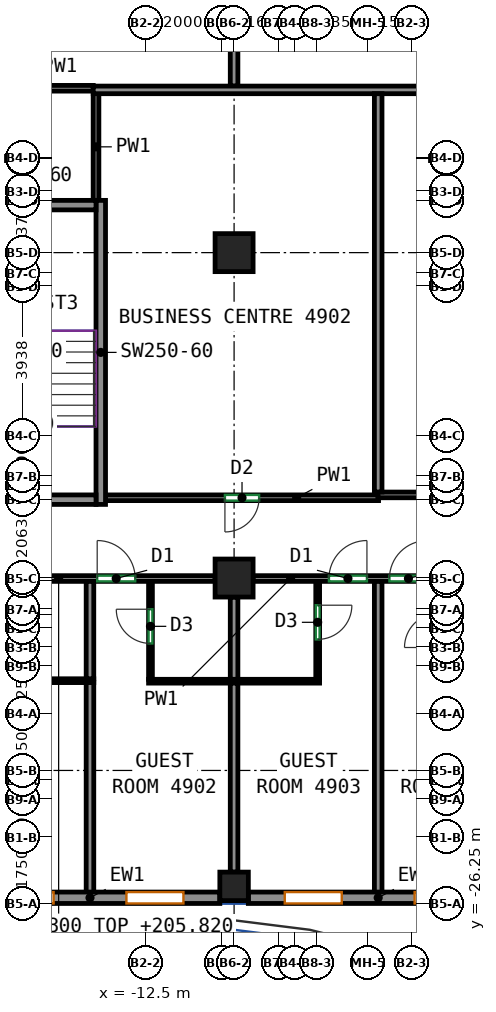
"""IFC4 building model, lengths in metres.
Left out: names, types, materials, properties, quantities, classifications, styles, units other than length and angle.
Written with IfcOpenShell. Run it as: python <this file> out.ifc"""

import sys

from ifc_helpers import new_model, si_unit, direction, frame, frame_2d, origin, origin_2d, place, context, subcontext, project, spatial, rectangle, extrude, source, transform, mapped, element, fill, save


model = new_model("IFC4")
c1 = context("Model", 3, precision=1e-05, world=origin(), true_north=direction((0.0, 1.0)))
c2 = subcontext(c1, "Body", "Model", "MODEL_VIEW")
j1 = project(units=[si_unit("LENGTHUNIT", "METRE"), si_unit("PLANEANGLEUNIT", "RADIAN")], contexts=[c1])
p1 = place(None, origin())
s1 = spatial("IfcSite", under=j1, at=p1, CompositionType="ELEMENT")
p2 = place(p1, origin())
s2 = spatial("IfcBuilding", under=s1, at=p2, CompositionType="ELEMENT")
p3 = place(p2, frame((0.0, 0.0, 203.3)))
s3 = spatial("IfcBuildingStorey", under=s2, at=p3, CompositionType="ELEMENT", Elevation=203.3)
m1 = source(origin(), c2, "Body", "SweptSolid", [
    extrude(rectangle(XDim=0.75, YDim=0.75, at=origin_2d()), origin(), (0.0, 0.0, 1.0), 3.12),
])
p4 = place(p3, frame((-10.167, -25.8, 0.0), z_axis=(0.0, 0.0, 1.0), x_axis=(1.0, 0.0, 0.0)))
e1 = element("IfcColumn", 1, at=p4, inside=s3, PredefinedType="COLUMN", context=c2, shape_type="MappedRepresentation", body=[
    mapped(m1, transform((0.0, 0.0, 0.0))),
])
m2 = source(origin(), c2, "Body", "SweptSolid", [
    extrude(rectangle(XDim=1.0, YDim=1.0, at=origin_2d()), origin(), (0.0, 0.0, 1.0), 3.12),
])
for number, where, z_axis, x_axis in (
    (2, (-10.167, -17.688, 0.0), (0.0, 0.0, 1.0), (1.0, 0.0, 0.0)),
    (3, (-10.167, -9.125, 0.0), (0.0, 0.0, 1.0), (1.0, 0.0, 0.0)),
):
    element("IfcColumn", number, at=place(p3, frame(where, z_axis=z_axis, x_axis=x_axis)), inside=s3, PredefinedType="COLUMN", context=c2, shape_type="MappedRepresentation", body=[
        mapped(m2, transform((0.0, 0.0, 0.0))),
    ])
m3 = source(origin(), c2, "Body", "SweptSolid", [
    extrude(rectangle(XDim=8.0, YDim=0.25, at=frame_2d((4.0, 0.0))), origin(), (0.0, 0.0, 1.0), 3.12),
])
p5 = place(p3, frame((-13.675, -15.75, 0.0), z_axis=(0.0, 0.0, 1.0), x_axis=(0.0, 1.0, 0.0)))
e4 = element("IfcWall", 4, at=p5, inside=s3, PredefinedType="SHEAR", context=c2, shape_type="MappedRepresentation", body=[
    mapped(m3, transform((0.0, 0.0, 0.0))),
])
m4 = source(origin(), c2, "Body", "SweptSolid", [
    extrude(rectangle(XDim=3.7, YDim=0.25, at=frame_2d((1.85, 0.0))), origin(), (0.0, 0.0, 1.0), 3.12),
])
p6 = place(p3, frame((-17.5, -15.625, 0.0), z_axis=(0.0, 0.0, 1.0), x_axis=(1.0, 0.0, 0.0)))
e5 = element("IfcWall", 5, at=p6, inside=s3, PredefinedType="SHEAR", context=c2, shape_type="MappedRepresentation", body=[
    mapped(m4, transform((0.0, 0.0, 0.0))),
])
p7 = place(p6, frame((1.25, 0.0, 0.0)))
e6 = element("IfcOpeningElement", 6, at=p7, cuts=e5, PredefinedType="OPENING", context=c2, shape_type="SweptSolid", body=[
    extrude(rectangle(XDim=1.2, YDim=2.1, at=frame_2d((0.6, 1.05))), frame((0.0, 0.135, 0.0), z_axis=(0.0, -1.0, 0.0), x_axis=(1.0, 0.0, 0.0)), (0.0, 0.0, 1.0), 0.27),
])
p8 = place(p3, frame((-17.5, -7.875, 0.0), z_axis=(0.0, 0.0, 1.0), x_axis=(1.0, 0.0, 0.0)))
e7 = element("IfcWall", 7, at=p8, inside=s3, PredefinedType="SHEAR", context=c2, shape_type="MappedRepresentation", body=[
    mapped(m4, transform((0.0, 0.0, 0.0))),
])
m5 = source(origin(), c2, "Body", "SweptSolid", [
    extrude(rectangle(XDim=6.833, YDim=0.3, at=frame_2d((3.417, 0.0))), origin(), (0.0, 0.0, 1.0), 3.12),
])
p9 = place(p3, frame((-17.375, -26.1, 0.0), z_axis=(0.0, 0.0, 1.0), x_axis=(1.0, 0.0, 0.0)))
e8 = element("IfcWall", 8, at=p9, inside=s3, PredefinedType="SOLIDWALL", context=c2, shape_type="MappedRepresentation", body=[
    mapped(m5, transform((0.0, 0.0, 0.0))),
])
p10 = place(p9, frame((0.958, 0.0, 0.85)))
e9 = element("IfcOpeningElement", 9, at=p10, cuts=e8, PredefinedType="OPENING", context=c2, shape_type="SweptSolid", body=[
    extrude(rectangle(XDim=1.5, YDim=1.95, at=frame_2d((0.75, 0.975))), frame((0.0, 0.16, 0.0), z_axis=(0.0, -1.0, 0.0), x_axis=(1.0, 0.0, 0.0)), (0.0, 0.0, 1.0), 0.32),
])
p11 = place(p9, frame((4.375, 0.0, 0.85)))
e10 = element("IfcOpeningElement", 10, at=p11, cuts=e8, PredefinedType="OPENING", context=c2, shape_type="SweptSolid", body=[
    extrude(rectangle(XDim=1.5, YDim=1.95, at=frame_2d((0.75, 0.975))), frame((0.0, 0.16, 0.0), z_axis=(0.0, -1.0, 0.0), x_axis=(1.0, 0.0, 0.0)), (0.0, 0.0, 1.0), 0.32),
])
m6 = source(origin(), c2, "Body", "SweptSolid", [
    extrude(rectangle(XDim=6.833, YDim=0.3, at=frame_2d((3.417, 0.0))), origin(), (0.0, 0.0, 1.0), 3.12),
])
p12 = place(p3, frame((-9.792, -26.1, 0.0), z_axis=(0.0, 0.0, 1.0), x_axis=(1.0, 0.0, 0.0)))
e11 = element("IfcWall", 11, at=p12, inside=s3, PredefinedType="SOLIDWALL", context=c2, shape_type="MappedRepresentation", body=[
    mapped(m6, transform((0.0, 0.0, 0.0))),
])
p13 = place(p12, frame((0.958, 0.0, 0.85)))
e12 = element("IfcOpeningElement", 12, at=p13, cuts=e11, PredefinedType="OPENING", context=c2, shape_type="SweptSolid", body=[
    extrude(rectangle(XDim=1.5, YDim=1.95, at=frame_2d((0.75, 0.975))), frame((0.0, 0.16, 0.0), z_axis=(0.0, -1.0, 0.0), x_axis=(1.0, 0.0, 0.0)), (0.0, 0.0, 1.0), 0.32),
])
p14 = place(p12, frame((4.375, 0.0, 0.85)))
e13 = element("IfcOpeningElement", 13, at=p14, cuts=e11, PredefinedType="OPENING", context=c2, shape_type="SweptSolid", body=[
    extrude(rectangle(XDim=1.5, YDim=1.95, at=frame_2d((0.75, 0.975))), frame((0.0, 0.16, 0.0), z_axis=(0.0, -1.0, 0.0), x_axis=(1.0, 0.0, 0.0)), (0.0, 0.0, 1.0), 0.32),
])
p15 = place(p3, frame((-18.9, -17.7, 0.0), z_axis=(0.0, 0.0, 1.0), x_axis=(1.0, 0.0, 0.0)))
e14 = element("IfcWall", 14, at=p15, inside=s3, PredefinedType="PARTITIONING", context=c2, shape_type="SweptSolid", body=[
    extrude(rectangle(XDim=8.233, YDim=0.15, at=frame_2d((4.116, 0.0))), origin(), (0.0, 0.0, 1.0), 2.52),
])
p16 = place(p15, frame((1.135, 0.0, 0.0)))
e15 = element("IfcOpeningElement", 15, at=p16, cuts=e14, PredefinedType="OPENING", context=c2, shape_type="SweptSolid", body=[
    extrude(rectangle(XDim=1.0, YDim=2.1, at=frame_2d((0.5, 1.05))), frame((0.0, 0.085, 0.0), z_axis=(0.0, -1.0, 0.0), x_axis=(1.0, 0.0, 0.0)), (0.0, 0.0, 1.0), 0.17),
])
p17 = place(p15, frame((5.131, 0.0, 0.0)))
e16 = element("IfcOpeningElement", 16, at=p17, cuts=e14, PredefinedType="OPENING", context=c2, shape_type="SweptSolid", body=[
    extrude(rectangle(XDim=1.0, YDim=2.1, at=frame_2d((0.5, 1.05))), frame((0.0, 0.085, 0.0), z_axis=(0.0, -1.0, 0.0), x_axis=(1.0, 0.0, 0.0)), (0.0, 0.0, 1.0), 0.17),
])
p18 = place(p3, frame((-9.667, -17.7, 0.0), z_axis=(0.0, 0.0, 1.0), x_axis=(1.0, 0.0, 0.0)))
e17 = element("IfcWall", 17, at=p18, inside=s3, PredefinedType="PARTITIONING", context=c2, shape_type="SweptSolid", body=[
    extrude(rectangle(XDim=6.584, YDim=0.15, at=frame_2d((3.292, 0.0))), origin(), (0.0, 0.0, 1.0), 3.12),
])
p19 = place(p18, frame((1.996, 0.0, 0.0)))
e18 = element("IfcOpeningElement", 18, at=p19, cuts=e17, PredefinedType="OPENING", context=c2, shape_type="SweptSolid", body=[
    extrude(rectangle(XDim=1.0, YDim=2.1, at=frame_2d((0.5, 1.05))), frame((0.0, 0.085, 0.0), z_axis=(0.0, -1.0, 0.0), x_axis=(1.0, 0.0, 0.0)), (0.0, 0.0, 1.0), 0.17),
])
p20 = place(p18, frame((3.588, 0.0, 0.0)))
e19 = element("IfcOpeningElement", 19, at=p20, cuts=e17, PredefinedType="OPENING", context=c2, shape_type="SweptSolid", body=[
    extrude(rectangle(XDim=1.0, YDim=2.1, at=frame_2d((0.5, 1.05))), frame((0.0, 0.085, 0.0), z_axis=(0.0, -1.0, 0.0), x_axis=(1.0, 0.0, 0.0)), (0.0, 0.0, 1.0), 0.17),
])
p21 = place(p3, frame((-17.575, -4.8, 0.0), z_axis=(0.0, 0.0, 1.0), x_axis=(1.0, 0.0, 0.0)))
e20 = element("IfcWall", 20, at=p21, inside=s3, PredefinedType="PARTITIONING", context=c2, shape_type="SweptSolid", body=[
    extrude(rectangle(XDim=3.702, YDim=0.15, at=frame_2d((1.851, 0.0))), origin(), (0.0, 0.0, 1.0), 3.12),
])
p22 = place(p3, frame((-13.8, -7.75, 0.0), z_axis=(0.0, 0.0, 1.0), x_axis=(0.0, 1.0, 0.0)))
e21 = element("IfcWall", 21, at=p22, inside=s3, PredefinedType="PARTITIONING", context=c2, shape_type="SweptSolid", body=[
    extrude(rectangle(XDim=2.817, YDim=0.15, at=frame_2d((1.408, 0.0))), origin(), (0.0, 0.0, 1.0), 3.12),
])
p23 = place(p3, frame((-6.365, -15.575, 0.0), z_axis=(0.0, 0.0, 1.0), x_axis=(-1.0, 0.0, 0.0)))
e22 = element("IfcWall", 22, at=p23, inside=s3, PredefinedType="PARTITIONING", context=c2, shape_type="SweptSolid", body=[
    extrude(rectangle(XDim=7.185, YDim=0.15, at=frame_2d((3.593, 0.0))), origin(), (0.0, 0.0, 1.0), 3.12),
])
p24 = place(p23, frame((3.143, 0.0, 0.0)))
e23 = element("IfcOpeningElement", 23, at=p24, cuts=e22, PredefinedType="OPENING", context=c2, shape_type="SweptSolid", body=[
    extrude(rectangle(XDim=0.9, YDim=2.1, at=frame_2d((0.45, 1.05))), frame((0.0, 0.085, 0.0), z_axis=(0.0, -1.0, 0.0), x_axis=(1.0, 0.0, 0.0)), (0.0, 0.0, 1.0), 0.17),
])
p25 = place(p3, frame((-6.385, -15.5, 0.0), z_axis=(0.0, 0.0, 1.0), x_axis=(1.0, 0.0, 0.0)))
e24 = element("IfcWall", 24, at=p25, inside=s3, PredefinedType="PARTITIONING", context=c2, shape_type="SweptSolid", body=[
    extrude(rectangle(XDim=22.66, YDim=0.15, at=frame_2d((11.33, 0.0))), origin(), (0.0, 0.0, 1.0), 3.12),
])
p26 = place(p25, frame((7.266, 0.0, 0.0)))
e25 = element("IfcOpeningElement", 25, at=p26, cuts=e24, PredefinedType="OPENING", context=c2, shape_type="SweptSolid", body=[
    extrude(rectangle(XDim=0.9, YDim=2.1, at=frame_2d((0.45, 1.05))), frame((0.0, 0.085, 0.0), z_axis=(0.0, -1.0, 0.0), x_axis=(1.0, 0.0, 0.0)), (0.0, 0.0, 1.0), 0.17),
])
p27 = place(p25, frame((14.576, 0.0, 0.0)))
e26 = element("IfcOpeningElement", 26, at=p27, cuts=e24, PredefinedType="OPENING", context=c2, shape_type="SweptSolid", body=[
    extrude(rectangle(XDim=0.9, YDim=2.1, at=frame_2d((0.45, 1.05))), frame((0.0, 0.085, 0.0), z_axis=(0.0, -1.0, 0.0), x_axis=(1.0, 0.0, 0.0)), (0.0, 0.0, 1.0), 0.17),
])
p28 = place(p3, frame((-16.209, -20.388, 0.0), z_axis=(0.0, 0.0, 1.0), x_axis=(1.0, 0.0, 0.0)))
e27 = element("IfcWall", 27, at=p28, inside=s3, PredefinedType="PARTITIONING", context=c2, shape_type="SweptSolid", body=[
    extrude(rectangle(XDim=2.35, YDim=0.1, at=frame_2d((1.175, 0.0))), origin(), (0.0, 0.0, 1.0), 3.12),
])
p29 = place(p3, frame((-13.959, -26.0, 0.0), z_axis=(0.0, 0.0, 1.0), x_axis=(0.0, 1.0, 0.0)))
e28 = element("IfcWall", 28, at=p29, inside=s3, PredefinedType="PARTITIONING", context=c2, shape_type="SweptSolid", body=[
    extrude(rectangle(XDim=5.562, YDim=0.2, at=frame_2d((2.781, 0.0))), origin(), (0.0, 0.0, 1.0), 3.12),
])
p30 = place(p3, frame((-13.959, -20.338, 0.0), z_axis=(0.0, 0.0, 1.0), x_axis=(0.0, 1.0, 0.0)))
e29 = element("IfcWall", 29, at=p30, inside=s3, PredefinedType="PARTITIONING", context=c2, shape_type="SweptSolid", body=[
    extrude(rectangle(XDim=2.561, YDim=0.2, at=frame_2d((1.28, 0.0))), origin(), (0.0, 0.0, 1.0), 3.12),
])
p31 = place(p3, frame((-12.367, -20.352, 0.0), z_axis=(0.0, 0.0, 1.0), x_axis=(0.0, 1.0, 0.0)))
e30 = element("IfcWall", 30, at=p31, inside=s3, PredefinedType="PARTITIONING", context=c2, shape_type="SweptSolid", body=[
    extrude(rectangle(XDim=2.575, YDim=0.1, at=frame_2d((1.288, 0.0))), origin(), (0.0, 0.0, 1.0), 3.12),
])
p32 = place(p31, frame((0.944, 0.0, 0.0)))
e31 = element("IfcOpeningElement", 31, at=p32, cuts=e30, PredefinedType="OPENING", context=c2, shape_type="SweptSolid", body=[
    extrude(rectangle(XDim=0.9, YDim=2.1, at=frame_2d((0.45, 1.05))), frame((0.0, 0.06, 0.0), z_axis=(0.0, -1.0, 0.0), x_axis=(1.0, 0.0, 0.0)), (0.0, 0.0, 1.0), 0.12),
])
p33 = place(p3, frame((-12.417, -20.402, 0.0), z_axis=(0.0, 0.0, 1.0), x_axis=(1.0, 0.0, 0.0)))
e32 = element("IfcWall", 32, at=p33, inside=s3, PredefinedType="PARTITIONING", context=c2, shape_type="SweptSolid", body=[
    extrude(rectangle(XDim=4.5, YDim=0.1, at=frame_2d((2.25, 0.0))), origin(), (0.0, 0.0, 1.0), 3.12),
])
p34 = place(p3, frame((-10.167, -25.425, 0.0), z_axis=(0.0, 0.0, 1.0), x_axis=(0.0, 1.0, 0.0)))
e33 = element("IfcWall", 33, at=p34, inside=s3, PredefinedType="PARTITIONING", context=c2, shape_type="SweptSolid", body=[
    extrude(rectangle(XDim=4.973, YDim=0.2, at=frame_2d((2.487, 0.0))), origin(), (0.0, 0.0, 1.0), 3.12),
])
p35 = place(p3, frame((-10.167, -20.352, 0.0), z_axis=(0.0, 0.0, 1.0), x_axis=(0.0, 1.0, 0.0)))
e34 = element("IfcWall", 34, at=p35, inside=s3, PredefinedType="PARTITIONING", context=c2, shape_type="SweptSolid", body=[
    extrude(rectangle(XDim=2.164, YDim=0.2, at=frame_2d((1.082, 0.0))), origin(), (0.0, 0.0, 1.0), 3.12),
])
p36 = place(p3, frame((-7.967, -17.777, 0.0), z_axis=(0.0, 0.0, 1.0), x_axis=(0.0, -1.0, 0.0)))
e35 = element("IfcWall", 35, at=p36, inside=s3, PredefinedType="PARTITIONING", context=c2, shape_type="SweptSolid", body=[
    extrude(rectangle(XDim=2.575, YDim=0.1, at=frame_2d((1.288, 0.0))), origin(), (0.0, 0.0, 1.0), 3.12),
])
p37 = place(p36, frame((0.625, 0.0, 0.0)))
e36 = element("IfcOpeningElement", 36, at=p37, cuts=e35, PredefinedType="OPENING", context=c2, shape_type="SweptSolid", body=[
    extrude(rectangle(XDim=0.9, YDim=2.1, at=frame_2d((0.45, 1.05))), frame((0.0, 0.06, 0.0), z_axis=(0.0, -1.0, 0.0), x_axis=(1.0, 0.0, 0.0)), (0.0, 0.0, 1.0), 0.12),
])
p38 = place(p3, frame((-6.375, -26.0, 0.0), z_axis=(0.0, 0.0, 1.0), x_axis=(0.0, 1.0, 0.0)))
e37 = element("IfcWall", 37, at=p38, inside=s3, PredefinedType="PARTITIONING", context=c2, shape_type="SweptSolid", body=[
    extrude(rectangle(XDim=8.223, YDim=0.2, at=frame_2d((4.111, 0.0))), origin(), (0.0, 0.0, 1.0), 3.12),
])
p39 = place(p3, frame((-10.167, -4.743, 0.0), z_axis=(0.0, 0.0, 1.0), x_axis=(0.0, 1.0, 0.0)))
e38 = element("IfcWall", 38, at=p39, inside=s3, PredefinedType="PARTITIONING", context=c2, shape_type="SweptSolid", body=[
    extrude(rectangle(XDim=3.681, YDim=0.2, at=frame_2d((1.84, 0.0))), origin(), (0.0, 0.0, 1.0), 2.52),
])
p40 = place(p3, frame((-13.873, -4.843, 0.0), z_axis=(0.0, 0.0, 1.0), x_axis=(1.0, 0.0, 0.0)))
e39 = element("IfcWall", 39, at=p40, inside=s3, PredefinedType="PARTITIONING", context=c2, shape_type="SweptSolid", body=[
    extrude(rectangle(XDim=30.146, YDim=0.2, at=frame_2d((15.073, 0.0))), origin(), (0.0, 0.0, 1.0), 3.12),
])
p41 = place(p3, frame((-6.375, -15.423, 0.0), z_axis=(0.0, 0.0, 1.0), x_axis=(0.0, 1.0, 0.0)))
e40 = element("IfcWall", 40, at=p41, inside=s3, PredefinedType="PARTITIONING", context=c2, shape_type="SweptSolid", body=[
    extrude(rectangle(XDim=10.48, YDim=0.2, at=frame_2d((5.24, 0.0))), origin(), (0.0, 0.0, 1.0), 3.12),
])
p42 = place(p10, origin())
e41 = element("IfcWindow", 41, at=p42, inside=s3, PartitioningType="SINGLE_PANEL", PredefinedType="WINDOW", context=c2, shape_type="SweptSolid", body=[
    extrude(rectangle(XDim=1.5, YDim=1.95, at=frame_2d((0.75, 0.975))), frame((0.0, 0.03, 0.0), z_axis=(0.0, -1.0, 0.0), x_axis=(1.0, 0.0, 0.0)), (0.0, 0.0, 1.0), 0.06),
])
fill(e9, e41)
p43 = place(p11, origin())
e42 = element("IfcWindow", 42, at=p43, inside=s3, PartitioningType="SINGLE_PANEL", PredefinedType="WINDOW", context=c2, shape_type="SweptSolid", body=[
    extrude(rectangle(XDim=1.5, YDim=1.95, at=frame_2d((0.75, 0.975))), frame((0.0, 0.03, 0.0), z_axis=(0.0, -1.0, 0.0), x_axis=(1.0, 0.0, 0.0)), (0.0, 0.0, 1.0), 0.06),
])
fill(e10, e42)
p44 = place(p13, origin())
e43 = element("IfcWindow", 43, at=p44, inside=s3, PartitioningType="SINGLE_PANEL", PredefinedType="WINDOW", context=c2, shape_type="SweptSolid", body=[
    extrude(rectangle(XDim=1.5, YDim=1.95, at=frame_2d((0.75, 0.975))), frame((0.0, 0.03, 0.0), z_axis=(0.0, -1.0, 0.0), x_axis=(1.0, 0.0, 0.0)), (0.0, 0.0, 1.0), 0.06),
])
fill(e12, e43)
p45 = place(p14, origin())
e44 = element("IfcWindow", 44, at=p45, inside=s3, PartitioningType="SINGLE_PANEL", PredefinedType="WINDOW", context=c2, shape_type="SweptSolid", body=[
    extrude(rectangle(XDim=1.5, YDim=1.95, at=frame_2d((0.75, 0.975))), frame((0.0, 0.03, 0.0), z_axis=(0.0, -1.0, 0.0), x_axis=(1.0, 0.0, 0.0)), (0.0, 0.0, 1.0), 0.06),
])
fill(e13, e44)
p46 = place(p32, origin())
e45 = element("IfcDoor", 45, at=p46, inside=s3, OperationType="SINGLE_SWING_RIGHT", PredefinedType="DOOR", context=c2, shape_type="SweptSolid", body=[
    extrude(rectangle(XDim=0.9, YDim=2.1, at=frame_2d((0.45, 1.05))), frame((0.0, 0.025, 0.0), z_axis=(0.0, -1.0, 0.0), x_axis=(1.0, 0.0, 0.0)), (0.0, 0.0, 1.0), 0.05),
])
fill(e31, e45)
p47 = place(p37, origin())
e46 = element("IfcDoor", 46, at=p47, inside=s3, OperationType="SINGLE_SWING_LEFT", PredefinedType="DOOR", context=c2, shape_type="SweptSolid", body=[
    extrude(rectangle(XDim=0.9, YDim=2.1, at=frame_2d((0.45, 1.05))), frame((0.0, 0.025, 0.0), z_axis=(0.0, -1.0, 0.0), x_axis=(1.0, 0.0, 0.0)), (0.0, 0.0, 1.0), 0.05),
])
fill(e36, e46)
p48 = place(p17, origin())
e47 = element("IfcDoor", 47, at=p48, inside=s3, OperationType="SINGLE_SWING_LEFT", PredefinedType="DOOR", context=c2, shape_type="SweptSolid", body=[
    extrude(rectangle(XDim=1.0, YDim=2.1, at=frame_2d((0.5, 1.05))), frame((0.0, 0.025, 0.0), z_axis=(0.0, -1.0, 0.0), x_axis=(1.0, 0.0, 0.0)), (0.0, 0.0, 1.0), 0.05),
])
fill(e16, e47)
p49 = place(p19, origin())
e48 = element("IfcDoor", 48, at=p49, inside=s3, OperationType="SINGLE_SWING_RIGHT", PredefinedType="DOOR", context=c2, shape_type="SweptSolid", body=[
    extrude(rectangle(XDim=1.0, YDim=2.1, at=frame_2d((0.5, 1.05))), frame((0.0, 0.025, 0.0), z_axis=(0.0, -1.0, 0.0), x_axis=(1.0, 0.0, 0.0)), (0.0, 0.0, 1.0), 0.05),
])
fill(e18, e48)
p50 = place(p20, origin())
e49 = element("IfcDoor", 49, at=p50, inside=s3, OperationType="SINGLE_SWING_RIGHT", PredefinedType="DOOR", context=c2, shape_type="SweptSolid", body=[
    extrude(rectangle(XDim=1.0, YDim=2.1, at=frame_2d((0.5, 1.05))), frame((0.0, 0.025, 0.0), z_axis=(0.0, -1.0, 0.0), x_axis=(1.0, 0.0, 0.0)), (0.0, 0.0, 1.0), 0.05),
])
fill(e19, e49)
p51 = place(p24, origin())
e50 = element("IfcDoor", 50, at=p51, inside=s3, OperationType="SINGLE_SWING_RIGHT", PredefinedType="DOOR", context=c2, shape_type="SweptSolid", body=[
    extrude(rectangle(XDim=0.9, YDim=2.1, at=frame_2d((0.45, 1.05))), frame((0.0, 0.025, 0.0), z_axis=(0.0, -1.0, 0.0), x_axis=(1.0, 0.0, 0.0)), (0.0, 0.0, 1.0), 0.05),
])
fill(e23, e50)
save(model, sys.argv[1])
